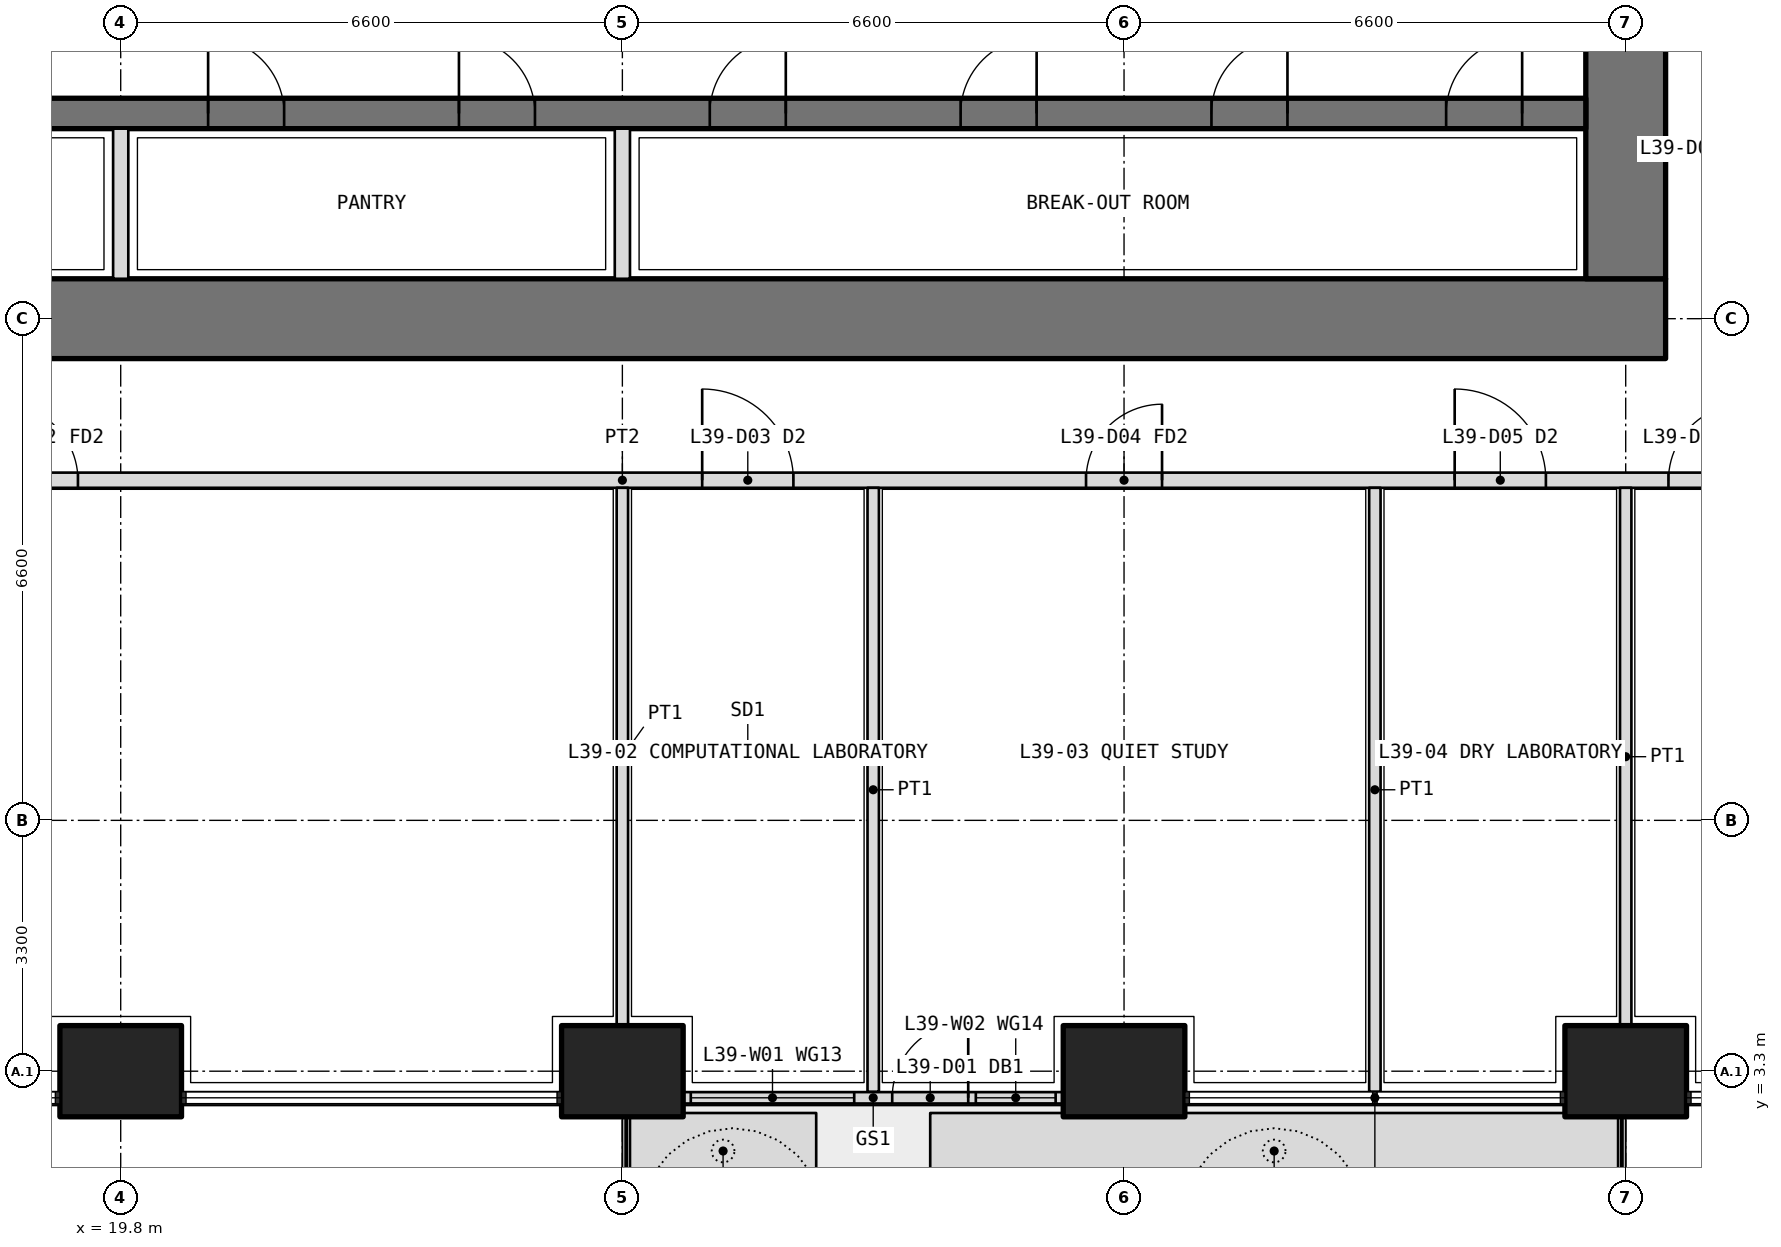
"""IFC4 building model, lengths in metres.
Left out: names, types, materials, properties, quantities, classifications, styles, units other than length and angle.
Written with IfcOpenShell. Run it as: python <this file> out.ifc"""

import sys

from ifc_helpers import new_model, si_unit, direction, frame, frame_2d, origin, origin_2d, place, context, subcontext, project, spatial, polyline, rectangle, outline, extrude, element, fill, save


model = new_model("IFC4")
c1 = context("Model", 3, precision=1e-05, world=origin(), true_north=direction((0.0, 1.0)))
c2 = subcontext(c1, "Body", "Model", "MODEL_VIEW")
j1 = project(units=[si_unit("LENGTHUNIT", "METRE"), si_unit("PLANEANGLEUNIT", "RADIAN")], contexts=[c1])
p1 = place(None, origin())
s1 = spatial("IfcSite", under=j1, at=p1, CompositionType="ELEMENT")
p2 = place(p1, origin())
s2 = spatial("IfcBuilding", under=s1, at=p2, CompositionType="ELEMENT")
p3 = place(p2, frame((0.0, 0.0, 172.5)))
s3 = spatial("IfcBuildingStorey", under=s2, at=p3, CompositionType="ELEMENT", Elevation=172.5)
for number, where, z_axis, x_axis in (
    (1, (19.8, 3.3, 0.0), (0.0, 0.0, 1.0), (1.0, 0.0, 0.0)),
    (2, (26.4, 3.3, 0.0), (0.0, 0.0, 1.0), (1.0, 0.0, 0.0)),
    (3, (33.0, 3.3, 0.0), (0.0, 0.0, 1.0), (1.0, 0.0, 0.0)),
    (4, (39.6, 3.3, 0.0), (0.0, 0.0, 1.0), (1.0, 0.0, 0.0)),
):
    element("IfcColumn", number, at=place(p3, frame(where, z_axis=z_axis, x_axis=x_axis)), inside=s3, PredefinedType="COLUMN", context=c2, shape_type="SweptSolid", body=[
        extrude(rectangle(XDim=1.6, YDim=1.2, at=origin_2d()), origin(), (0.0, 0.0, 1.0), 4.2),
    ])
p4 = place(p3, origin())
e5 = element("IfcWall", 5, at=p4, inside=s3, PredefinedType="USERDEFINED", context=c2, shape_type="SweptSolid", body=[
    extrude(outline(polyline([(26.5, 1.75), (28.95, 1.75), (28.95, 2.75), (26.5, 2.75), (26.5, 1.75)]), holes=[polyline([(26.65, 1.9), (28.8, 1.9), (28.8, 2.6), (26.65, 2.6), (26.65, 1.9)])]), origin(), (0.0, 0.0, 1.0), 1.05),
])
p5 = place(p3, origin())
e6 = element("IfcWall", 6, at=p5, inside=s3, PredefinedType="USERDEFINED", context=c2, shape_type="SweptSolid", body=[
    extrude(outline(polyline([(30.45, 1.75), (39.5, 1.75), (39.5, 2.75), (30.45, 2.75), (30.45, 1.75)]), holes=[polyline([(30.6, 1.9), (39.35, 1.9), (39.35, 2.6), (30.6, 2.6), (30.6, 1.9)])]), origin(), (0.0, 0.0, 1.0), 1.05),
])
p6 = place(p3, frame((27.2, 2.95, 0.0), z_axis=(0.0, 0.0, 1.0), x_axis=(1.0, 0.0, 0.0)))
e7 = element("IfcWall", 7, at=p6, inside=s3, PredefinedType="SOLIDWALL", context=c2, shape_type="SweptSolid", body=[
    extrude(rectangle(XDim=5.0, YDim=0.15, at=frame_2d((2.5, 0.0))), origin(), (0.0, 0.0, 1.0), 2.7),
])
p7 = place(p6, frame((2.75, 0.0, 0.0)))
e8 = element("IfcOpeningElement", 8, at=p7, cuts=e7, PredefinedType="OPENING", context=c2, shape_type="SweptSolid", body=[
    extrude(rectangle(XDim=1.0, YDim=2.4, at=frame_2d((0.5, 1.2))), frame((0.0, 0.085, 0.0), z_axis=(0.0, -1.0, 0.0), x_axis=(1.0, 0.0, 0.0)), (0.0, 0.0, 1.0), 0.17),
])
p8 = place(p6, frame((0.1, 0.0, 0.1)))
e9 = element("IfcOpeningElement", 9, at=p8, cuts=e7, PredefinedType="OPENING", context=c2, shape_type="SweptSolid", body=[
    extrude(rectangle(XDim=2.15, YDim=2.3, at=frame_2d((1.075, 1.15))), frame((0.0, 0.085, 0.0), z_axis=(0.0, -1.0, 0.0), x_axis=(1.0, 0.0, 0.0)), (0.0, 0.0, 1.0), 0.17),
])
p9 = place(p6, frame((3.85, 0.0, 0.1)))
e10 = element("IfcOpeningElement", 10, at=p9, cuts=e7, PredefinedType="OPENING", context=c2, shape_type="SweptSolid", body=[
    extrude(rectangle(XDim=1.05, YDim=2.3, at=frame_2d((0.525, 1.15))), frame((0.0, 0.085, 0.0), z_axis=(0.0, -1.0, 0.0), x_axis=(1.0, 0.0, 0.0)), (0.0, 0.0, 1.0), 0.17),
])
p10 = place(p3, frame((12.675, 13.2, 0.0), z_axis=(0.0, 0.0, 1.0), x_axis=(1.0, 0.0, 0.0)))
e11 = element("IfcWall", 11, at=p10, inside=s3, PredefinedType="SHEAR", context=c2, shape_type="SweptSolid", body=[
    extrude(rectangle(XDim=27.45, YDim=1.05, at=frame_2d((13.725, 0.0))), origin(), (0.0, 0.0, 1.0), 4.2),
])
p11 = place(p3, frame((39.6, 13.725, 0.0), z_axis=(0.0, 0.0, 1.0), x_axis=(0.0, 1.0, 0.0)))
e12 = element("IfcWall", 12, at=p11, inside=s3, PredefinedType="SHEAR", context=c2, shape_type="SweptSolid", body=[
    extrude(rectangle(XDim=18.75, YDim=1.05, at=frame_2d((9.375, 0.0))), origin(), (0.0, 0.0, 1.0), 4.2),
])
p12 = place(p11, frame((3.025, 0.0, 0.0)))
e13 = element("IfcOpeningElement", 13, at=p12, cuts=e12, PredefinedType="OPENING", context=c2, shape_type="SweptSolid", body=[
    extrude(rectangle(XDim=1.6, YDim=2.1, at=frame_2d((0.8, 1.05))), frame((0.0, 0.535, 0.0), z_axis=(0.0, -1.0, 0.0), x_axis=(1.0, 0.0, 0.0)), (0.0, 0.0, 1.0), 1.07),
])
p13 = place(p11, frame((13.825, 0.0, 0.0)))
e14 = element("IfcOpeningElement", 14, at=p13, cuts=e12, PredefinedType="OPENING", context=c2, shape_type="SweptSolid", body=[
    extrude(rectangle(XDim=1.6, YDim=2.1, at=frame_2d((0.8, 1.05))), frame((0.0, 0.535, 0.0), z_axis=(0.0, -1.0, 0.0), x_axis=(1.0, 0.0, 0.0)), (0.0, 0.0, 1.0), 1.07),
])
p14 = place(p3, frame((13.725, 15.9, 0.0), z_axis=(0.0, 0.0, 1.0), x_axis=(1.0, 0.0, 0.0)))
e15 = element("IfcWall", 15, at=p14, inside=s3, PredefinedType="SHEAR", context=c2, shape_type="SweptSolid", body=[
    extrude(rectangle(XDim=25.35, YDim=0.4, at=frame_2d((12.675, 0.0))), origin(), (0.0, 0.0, 1.0), 4.2),
])
p15 = place(p14, frame((0.837, 0.0, 0.0)))
e16 = element("IfcOpeningElement", 16, at=p15, cuts=e15, PredefinedType="OPENING", context=c2, shape_type="SweptSolid", body=[
    extrude(rectangle(XDim=1.0, YDim=2.1, at=frame_2d((0.5, 1.05))), frame((0.0, 0.21, 0.0), z_axis=(0.0, -1.0, 0.0), x_axis=(1.0, 0.0, 0.0)), (0.0, 0.0, 1.0), 0.42),
])
p16 = place(p14, frame((3.925, 0.0, 0.0)))
e17 = element("IfcOpeningElement", 17, at=p16, cuts=e15, PredefinedType="OPENING", context=c2, shape_type="SweptSolid", body=[
    extrude(rectangle(XDim=1.0, YDim=2.1, at=frame_2d((0.5, 1.05))), frame((0.0, 0.21, 0.0), z_axis=(0.0, -1.0, 0.0), x_axis=(1.0, 0.0, 0.0)), (0.0, 0.0, 1.0), 0.42),
])
p17 = place(p14, frame((7.225, 0.0, 0.0)))
e18 = element("IfcOpeningElement", 18, at=p17, cuts=e15, PredefinedType="OPENING", context=c2, shape_type="SweptSolid", body=[
    extrude(rectangle(XDim=1.0, YDim=2.1, at=frame_2d((0.5, 1.05))), frame((0.0, 0.21, 0.0), z_axis=(0.0, -1.0, 0.0), x_axis=(1.0, 0.0, 0.0)), (0.0, 0.0, 1.0), 0.42),
])
p18 = place(p14, frame((10.525, 0.0, 0.0)))
e19 = element("IfcOpeningElement", 19, at=p18, cuts=e15, PredefinedType="OPENING", context=c2, shape_type="SweptSolid", body=[
    extrude(rectangle(XDim=1.0, YDim=2.1, at=frame_2d((0.5, 1.05))), frame((0.0, 0.21, 0.0), z_axis=(0.0, -1.0, 0.0), x_axis=(1.0, 0.0, 0.0)), (0.0, 0.0, 1.0), 0.42),
])
p19 = place(p14, frame((13.825, 0.0, 0.0)))
e20 = element("IfcOpeningElement", 20, at=p19, cuts=e15, PredefinedType="OPENING", context=c2, shape_type="SweptSolid", body=[
    extrude(rectangle(XDim=1.0, YDim=2.1, at=frame_2d((0.5, 1.05))), frame((0.0, 0.21, 0.0), z_axis=(0.0, -1.0, 0.0), x_axis=(1.0, 0.0, 0.0)), (0.0, 0.0, 1.0), 0.42),
])
p20 = place(p14, frame((17.125, 0.0, 0.0)))
e21 = element("IfcOpeningElement", 21, at=p20, cuts=e15, PredefinedType="OPENING", context=c2, shape_type="SweptSolid", body=[
    extrude(rectangle(XDim=1.0, YDim=2.1, at=frame_2d((0.5, 1.05))), frame((0.0, 0.21, 0.0), z_axis=(0.0, -1.0, 0.0), x_axis=(1.0, 0.0, 0.0)), (0.0, 0.0, 1.0), 0.42),
])
p21 = place(p14, frame((20.425, 0.0, 0.0)))
e22 = element("IfcOpeningElement", 22, at=p21, cuts=e15, PredefinedType="OPENING", context=c2, shape_type="SweptSolid", body=[
    extrude(rectangle(XDim=1.0, YDim=2.1, at=frame_2d((0.5, 1.05))), frame((0.0, 0.21, 0.0), z_axis=(0.0, -1.0, 0.0), x_axis=(1.0, 0.0, 0.0)), (0.0, 0.0, 1.0), 0.42),
])
p22 = place(p14, frame((23.512, 0.0, 0.0)))
e23 = element("IfcOpeningElement", 23, at=p22, cuts=e15, PredefinedType="OPENING", context=c2, shape_type="SweptSolid", body=[
    extrude(rectangle(XDim=1.0, YDim=2.1, at=frame_2d((0.5, 1.05))), frame((0.0, 0.21, 0.0), z_axis=(0.0, -1.0, 0.0), x_axis=(1.0, 0.0, 0.0)), (0.0, 0.0, 1.0), 0.42),
])
for number, where, z_axis, x_axis in (
    (24, (19.8, 13.725, 0.0), (0.0, 0.0, 1.0), (0.0, 1.0, 0.0)),
    (25, (26.4, 13.725, 0.0), (0.0, 0.0, 1.0), (0.0, 1.0, 0.0)),
):
    element("IfcWall", number, at=place(p3, frame(where, z_axis=z_axis, x_axis=x_axis)), inside=s3, PredefinedType="PARTITIONING", context=c2, shape_type="SweptSolid", body=[
        extrude(rectangle(XDim=1.975, YDim=0.2, at=frame_2d((0.987, 0.0))), origin(), (0.0, 0.0, 1.0), 4.2),
    ])
p23 = place(p3, frame((10.975, 11.075, 0.0), z_axis=(0.0, 0.0, 1.0), x_axis=(1.0, 0.0, 0.0)))
e26 = element("IfcWall", 26, at=p23, inside=s3, PredefinedType="PARTITIONING", context=c2, shape_type="SweptSolid", body=[
    extrude(rectangle(XDim=30.85, YDim=0.2, at=frame_2d((15.425, 0.0))), origin(), (0.0, 0.0, 1.0), 2.85),
])
p24 = place(p23, frame((7.262, 0.0, 0.0)))
e27 = element("IfcOpeningElement", 27, at=p24, cuts=e26, PredefinedType="OPENING", context=c2, shape_type="SweptSolid", body=[
    extrude(rectangle(XDim=1.0, YDim=2.1, at=frame_2d((0.5, 1.05))), frame((0.0, 0.11, 0.0), z_axis=(0.0, -1.0, 0.0), x_axis=(1.0, 0.0, 0.0)), (0.0, 0.0, 1.0), 0.22),
])
p25 = place(p23, frame((16.475, 0.0, 0.0)))
e28 = element("IfcOpeningElement", 28, at=p25, cuts=e26, PredefinedType="OPENING", context=c2, shape_type="SweptSolid", body=[
    extrude(rectangle(XDim=1.2, YDim=2.1, at=frame_2d((0.6, 1.05))), frame((0.0, 0.11, 0.0), z_axis=(0.0, -1.0, 0.0), x_axis=(1.0, 0.0, 0.0)), (0.0, 0.0, 1.0), 0.22),
])
p26 = place(p23, frame((21.525, 0.0, 0.0)))
e29 = element("IfcOpeningElement", 29, at=p26, cuts=e26, PredefinedType="OPENING", context=c2, shape_type="SweptSolid", body=[
    extrude(rectangle(XDim=1.0, YDim=2.1, at=frame_2d((0.5, 1.05))), frame((0.0, 0.11, 0.0), z_axis=(0.0, -1.0, 0.0), x_axis=(1.0, 0.0, 0.0)), (0.0, 0.0, 1.0), 0.22),
])
p27 = place(p23, frame((26.375, 0.0, 0.0)))
e30 = element("IfcOpeningElement", 30, at=p27, cuts=e26, PredefinedType="OPENING", context=c2, shape_type="SweptSolid", body=[
    extrude(rectangle(XDim=1.2, YDim=2.1, at=frame_2d((0.6, 1.05))), frame((0.0, 0.11, 0.0), z_axis=(0.0, -1.0, 0.0), x_axis=(1.0, 0.0, 0.0)), (0.0, 0.0, 1.0), 0.22),
])
p28 = place(p23, frame((29.188, 0.0, 0.0)))
e31 = element("IfcOpeningElement", 31, at=p28, cuts=e26, PredefinedType="OPENING", context=c2, shape_type="SweptSolid", body=[
    extrude(rectangle(XDim=1.0, YDim=2.1, at=frame_2d((0.5, 1.05))), frame((0.0, 0.11, 0.0), z_axis=(0.0, -1.0, 0.0), x_axis=(1.0, 0.0, 0.0)), (0.0, 0.0, 1.0), 0.22),
])
p29 = place(p3, frame((26.4, 3.9, 0.0), z_axis=(0.0, 0.0, 1.0), x_axis=(0.0, 1.0, 0.0)))
e32 = element("IfcWall", 32, at=p29, inside=s3, PredefinedType="PARTITIONING", context=c2, shape_type="SweptSolid", body=[
    extrude(rectangle(XDim=7.075, YDim=0.15, at=frame_2d((3.538, 0.0))), origin(), (0.0, 0.0, 1.0), 2.85),
])
for number, where, z_axis, x_axis in (
    (33, (29.7, 3.03, 0.0), (0.0, 0.0, 1.0), (0.0, 1.0, 0.0)),
    (34, (36.3, 3.03, 0.0), (0.0, 0.0, 1.0), (0.0, 1.0, 0.0)),
):
    element("IfcWall", number, at=place(p3, frame(where, z_axis=z_axis, x_axis=x_axis)), inside=s3, PredefinedType="PARTITIONING", context=c2, shape_type="SweptSolid", body=[
        extrude(rectangle(XDim=7.945, YDim=0.15, at=frame_2d((3.973, 0.0))), origin(), (0.0, 0.0, 1.0), 2.7),
    ])
p30 = place(p3, frame((39.6, 3.9, 0.0), z_axis=(0.0, 0.0, 1.0), x_axis=(0.0, 1.0, 0.0)))
e35 = element("IfcWall", 35, at=p30, inside=s3, PredefinedType="PARTITIONING", context=c2, shape_type="SweptSolid", body=[
    extrude(rectangle(XDim=7.075, YDim=0.15, at=frame_2d((3.538, 0.0))), origin(), (0.0, 0.0, 1.0), 2.85),
])
p31 = place(p7, origin())
e36 = element("IfcDoor", 36, at=p31, inside=s3, OperationType="SINGLE_SWING_RIGHT", PredefinedType="DOOR", context=c2, shape_type="SweptSolid", body=[
    extrude(rectangle(XDim=1.0, YDim=2.4, at=frame_2d((0.5, 1.2))), frame((0.0, 0.025, 0.0), z_axis=(0.0, -1.0, 0.0), x_axis=(1.0, 0.0, 0.0)), (0.0, 0.0, 1.0), 0.05),
])
fill(e8, e36)
p32 = place(p8, origin())
e37 = element("IfcWindow", 37, at=p32, inside=s3, PartitioningType="SINGLE_PANEL", PredefinedType="WINDOW", context=c2, shape_type="SweptSolid", body=[
    extrude(rectangle(XDim=2.15, YDim=2.3, at=frame_2d((1.075, 1.15))), frame((0.0, 0.03, 0.0), z_axis=(0.0, -1.0, 0.0), x_axis=(1.0, 0.0, 0.0)), (0.0, 0.0, 1.0), 0.06),
])
fill(e9, e37)
p33 = place(p9, origin())
e38 = element("IfcWindow", 38, at=p33, inside=s3, PartitioningType="SINGLE_PANEL", PredefinedType="WINDOW", context=c2, shape_type="SweptSolid", body=[
    extrude(rectangle(XDim=1.05, YDim=2.3, at=frame_2d((0.525, 1.15))), frame((0.0, 0.03, 0.0), z_axis=(0.0, -1.0, 0.0), x_axis=(1.0, 0.0, 0.0)), (0.0, 0.0, 1.0), 0.06),
])
fill(e10, e38)
p34 = place(p24, origin())
e39 = element("IfcDoor", 39, at=p34, inside=s3, OperationType="SINGLE_SWING_LEFT", PredefinedType="DOOR", context=c2, shape_type="SweptSolid", body=[
    extrude(rectangle(XDim=1.0, YDim=2.1, at=frame_2d((0.5, 1.05))), frame((0.0, 0.025, 0.0), z_axis=(0.0, -1.0, 0.0), x_axis=(1.0, 0.0, 0.0)), (0.0, 0.0, 1.0), 0.05),
])
fill(e27, e39)
p35 = place(p25, origin())
e40 = element("IfcDoor", 40, at=p35, inside=s3, OperationType="DOUBLE_DOOR_SINGLE_SWING", PredefinedType="DOOR", context=c2, shape_type="SweptSolid", body=[
    extrude(rectangle(XDim=1.2, YDim=2.1, at=frame_2d((0.6, 1.05))), frame((0.0, 0.025, 0.0), z_axis=(0.0, -1.0, 0.0), x_axis=(1.0, 0.0, 0.0)), (0.0, 0.0, 1.0), 0.05),
])
fill(e28, e40)
p36 = place(p26, origin())
e41 = element("IfcDoor", 41, at=p36, inside=s3, OperationType="SINGLE_SWING_RIGHT", PredefinedType="DOOR", context=c2, shape_type="SweptSolid", body=[
    extrude(rectangle(XDim=1.0, YDim=2.1, at=frame_2d((0.5, 1.05))), frame((0.0, 0.025, 0.0), z_axis=(0.0, -1.0, 0.0), x_axis=(1.0, 0.0, 0.0)), (0.0, 0.0, 1.0), 0.05),
])
fill(e29, e41)
p37 = place(p27, origin())
e42 = element("IfcDoor", 42, at=p37, inside=s3, OperationType="DOUBLE_DOOR_SINGLE_SWING", PredefinedType="DOOR", context=c2, shape_type="SweptSolid", body=[
    extrude(rectangle(XDim=1.2, YDim=2.1, at=frame_2d((0.6, 1.05))), frame((0.0, 0.025, 0.0), z_axis=(0.0, -1.0, 0.0), x_axis=(1.0, 0.0, 0.0)), (0.0, 0.0, 1.0), 0.05),
])
fill(e30, e42)
p38 = place(p28, origin())
e43 = element("IfcDoor", 43, at=p38, inside=s3, OperationType="SINGLE_SWING_RIGHT", PredefinedType="DOOR", context=c2, shape_type="SweptSolid", body=[
    extrude(rectangle(XDim=1.0, YDim=2.1, at=frame_2d((0.5, 1.05))), frame((0.0, 0.025, 0.0), z_axis=(0.0, -1.0, 0.0), x_axis=(1.0, 0.0, 0.0)), (0.0, 0.0, 1.0), 0.05),
])
fill(e31, e43)
p39 = place(p17, origin())
e44 = element("IfcDoor", 44, at=p39, inside=s3, OperationType="SINGLE_SWING_LEFT", PredefinedType="DOOR", context=c2, shape_type="SweptSolid", body=[
    extrude(rectangle(XDim=1.0, YDim=2.1, at=frame_2d((0.5, 1.05))), frame((0.0, 0.025, 0.0), z_axis=(0.0, -1.0, 0.0), x_axis=(1.0, 0.0, 0.0)), (0.0, 0.0, 1.0), 0.05),
])
fill(e18, e44)
p40 = place(p18, origin())
e45 = element("IfcDoor", 45, at=p40, inside=s3, OperationType="SINGLE_SWING_LEFT", PredefinedType="DOOR", context=c2, shape_type="SweptSolid", body=[
    extrude(rectangle(XDim=1.0, YDim=2.1, at=frame_2d((0.5, 1.05))), frame((0.0, 0.025, 0.0), z_axis=(0.0, -1.0, 0.0), x_axis=(1.0, 0.0, 0.0)), (0.0, 0.0, 1.0), 0.05),
])
fill(e19, e45)
p41 = place(p19, origin())
e46 = element("IfcDoor", 46, at=p41, inside=s3, OperationType="SINGLE_SWING_RIGHT", PredefinedType="DOOR", context=c2, shape_type="SweptSolid", body=[
    extrude(rectangle(XDim=1.0, YDim=2.1, at=frame_2d((0.5, 1.05))), frame((0.0, 0.025, 0.0), z_axis=(0.0, -1.0, 0.0), x_axis=(1.0, 0.0, 0.0)), (0.0, 0.0, 1.0), 0.05),
])
fill(e20, e46)
p42 = place(p20, origin())
e47 = element("IfcDoor", 47, at=p42, inside=s3, OperationType="SINGLE_SWING_RIGHT", PredefinedType="DOOR", context=c2, shape_type="SweptSolid", body=[
    extrude(rectangle(XDim=1.0, YDim=2.1, at=frame_2d((0.5, 1.05))), frame((0.0, 0.025, 0.0), z_axis=(0.0, -1.0, 0.0), x_axis=(1.0, 0.0, 0.0)), (0.0, 0.0, 1.0), 0.05),
])
fill(e21, e47)
p43 = place(p21, origin())
e48 = element("IfcDoor", 48, at=p43, inside=s3, OperationType="SINGLE_SWING_RIGHT", PredefinedType="DOOR", context=c2, shape_type="SweptSolid", body=[
    extrude(rectangle(XDim=1.0, YDim=2.1, at=frame_2d((0.5, 1.05))), frame((0.0, 0.025, 0.0), z_axis=(0.0, -1.0, 0.0), x_axis=(1.0, 0.0, 0.0)), (0.0, 0.0, 1.0), 0.05),
])
fill(e22, e48)
p44 = place(p22, origin())
e49 = element("IfcDoor", 49, at=p44, inside=s3, OperationType="SINGLE_SWING_RIGHT", PredefinedType="DOOR", context=c2, shape_type="SweptSolid", body=[
    extrude(rectangle(XDim=1.0, YDim=2.1, at=frame_2d((0.5, 1.05))), frame((0.0, 0.025, 0.0), z_axis=(0.0, -1.0, 0.0), x_axis=(1.0, 0.0, 0.0)), (0.0, 0.0, 1.0), 0.05),
])
fill(e23, e49)
save(model, sys.argv[1])
